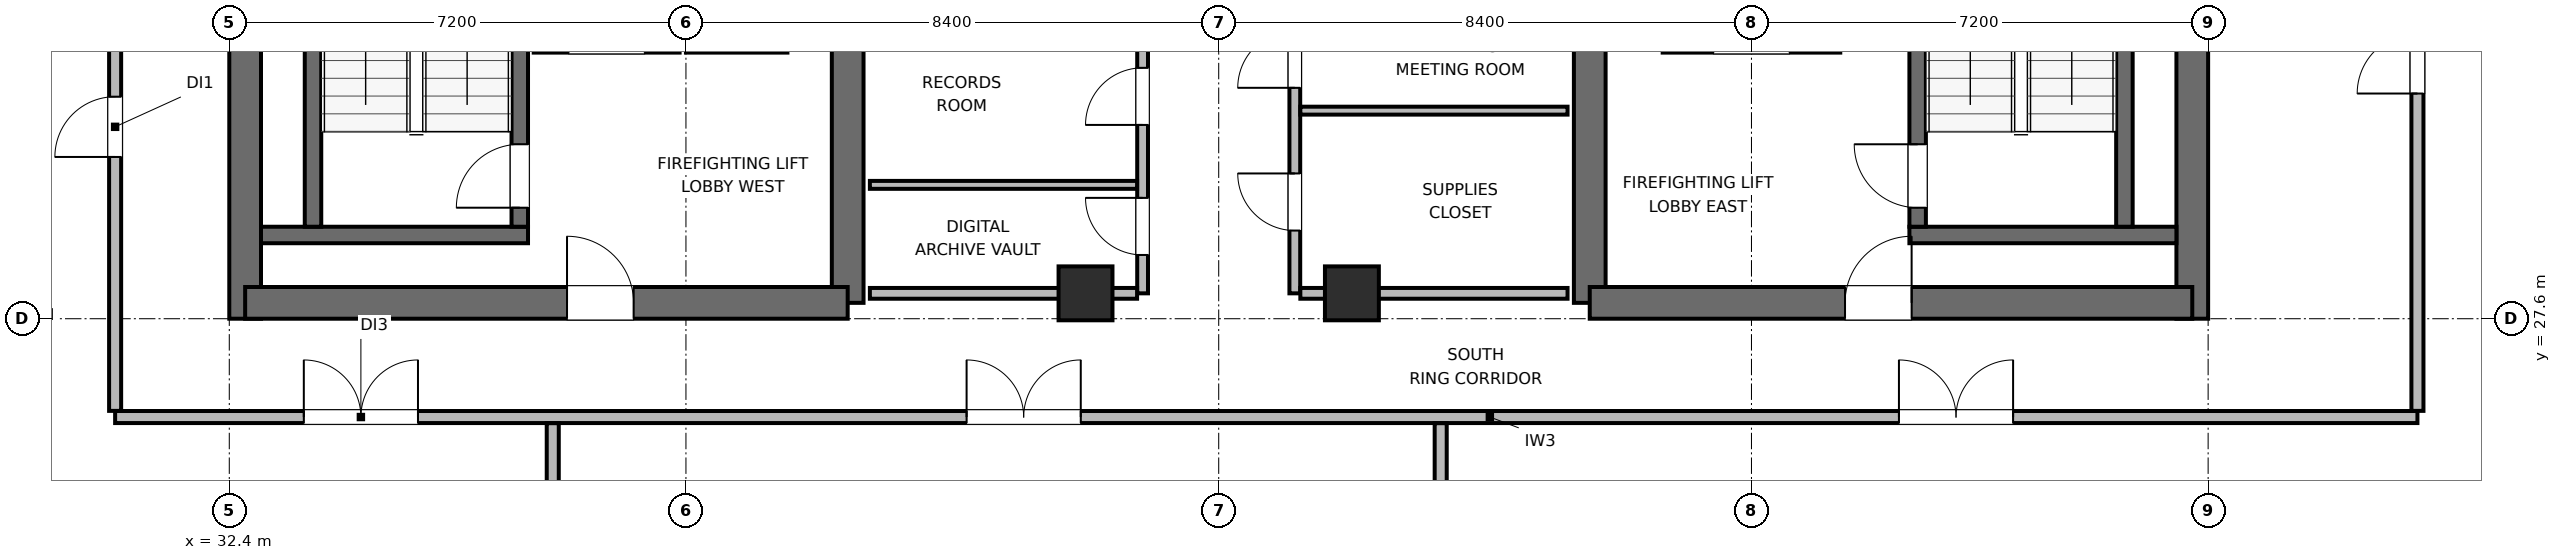
"""IFC4 building model, lengths in metres.
Left out: names, types, materials, properties, quantities, classifications, styles, units other than length and angle.
Written with IfcOpenShell. Run it as: python <this file> out.ifc"""

import sys

from ifc_helpers import new_model, si_unit, direction, frame, frame_2d, origin, origin_2d, place, context, subcontext, project, spatial, rectangle, extrude, element, fill, save


model = new_model("IFC4")
c1 = context("Model", 3, precision=1e-05, world=origin(), true_north=direction((0.0, 1.0)))
c2 = subcontext(c1, "Body", "Model", "MODEL_VIEW")
j1 = project(units=[si_unit("LENGTHUNIT", "METRE"), si_unit("PLANEANGLEUNIT", "RADIAN")], contexts=[c1])
p1 = place(None, origin())
s1 = spatial("IfcSite", under=j1, at=p1, CompositionType="ELEMENT")
p2 = place(p1, origin())
s2 = spatial("IfcBuilding", under=s1, at=p2, CompositionType="ELEMENT")
p3 = place(p2, frame((0.0, 0.0, 325.8)))
s3 = spatial("IfcBuildingStorey", under=s2, at=p3, CompositionType="ELEMENT", Elevation=325.8)
p4 = place(p3, frame((32.65, 27.6, 0.0), z_axis=(0.0, 0.0, 1.0), x_axis=(0.0, 1.0, 0.0)))
e1 = element("IfcWall", 1, at=p4, inside=s3, PredefinedType="SHEAR", context=c2, shape_type="SweptSolid", body=[
    extrude(rectangle(XDim=16.8, YDim=0.5, at=frame_2d((8.4, 0.0))), origin(), (0.0, 0.0, 1.0), 3.9),
])
p5 = place(p3, frame((42.15, 27.85, 0.0), z_axis=(0.0, 0.0, 1.0), x_axis=(0.0, 1.0, 0.0)))
e2 = element("IfcWall", 2, at=p5, inside=s3, PredefinedType="SHEAR", context=c2, shape_type="SweptSolid", body=[
    extrude(rectangle(XDim=6.55, YDim=0.5, at=frame_2d((3.275, 0.0))), origin(), (0.0, 0.0, 1.0), 3.9),
])
p6 = place(p3, frame((32.65, 27.85, 0.0), z_axis=(0.0, 0.0, 1.0), x_axis=(1.0, 0.0, 0.0)))
e3 = element("IfcWall", 3, at=p6, inside=s3, PredefinedType="SHEAR", context=c2, shape_type="SweptSolid", body=[
    extrude(rectangle(XDim=9.5, YDim=0.5, at=frame_2d((4.75, 0.0))), origin(), (0.0, 0.0, 1.0), 3.9),
])
p7 = place(p6, frame((5.075, 0.0, 0.0)))
e4 = element("IfcOpeningElement", 4, at=p7, cuts=e3, PredefinedType="OPENING", context=c2, shape_type="SweptSolid", body=[
    extrude(rectangle(XDim=1.05, YDim=2.04, at=frame_2d((0.525, 1.02))), frame((0.0, 0.26, 0.0), z_axis=(0.0, -1.0, 0.0), x_axis=(1.0, 0.0, 0.0)), (0.0, 0.0, 1.0), 0.52),
])
p8 = place(p3, frame((53.85, 27.85, 0.0), z_axis=(0.0, 0.0, 1.0), x_axis=(0.0, 1.0, 0.0)))
e5 = element("IfcWall", 5, at=p8, inside=s3, PredefinedType="SHEAR", context=c2, shape_type="SweptSolid", body=[
    extrude(rectangle(XDim=7.95, YDim=0.5, at=frame_2d((3.975, 0.0))), origin(), (0.0, 0.0, 1.0), 3.9),
])
p9 = place(p3, frame((63.35, 27.6, 0.0), z_axis=(0.0, 0.0, 1.0), x_axis=(0.0, 1.0, 0.0)))
e6 = element("IfcWall", 6, at=p9, inside=s3, PredefinedType="SHEAR", context=c2, shape_type="SweptSolid", body=[
    extrude(rectangle(XDim=16.8, YDim=0.5, at=frame_2d((8.4, 0.0))), origin(), (0.0, 0.0, 1.0), 3.9),
])
p10 = place(p3, frame((53.85, 27.85, 0.0), z_axis=(0.0, 0.0, 1.0), x_axis=(1.0, 0.0, 0.0)))
e7 = element("IfcWall", 7, at=p10, inside=s3, PredefinedType="SHEAR", context=c2, shape_type="SweptSolid", body=[
    extrude(rectangle(XDim=9.5, YDim=0.5, at=frame_2d((4.75, 0.0))), origin(), (0.0, 0.0, 1.0), 3.9),
])
p11 = place(p10, frame((4.025, 0.0, 0.0)))
e8 = element("IfcOpeningElement", 8, at=p11, cuts=e7, PredefinedType="OPENING", context=c2, shape_type="SweptSolid", body=[
    extrude(rectangle(XDim=1.05, YDim=2.04, at=frame_2d((0.525, 1.02))), frame((0.0, 0.26, 0.0), z_axis=(0.0, -1.0, 0.0), x_axis=(1.0, 0.0, 0.0)), (0.0, 0.0, 1.0), 0.52),
])
p12 = place(p3, frame((32.9, 28.92, 0.0), z_axis=(0.0, 0.0, 1.0), x_axis=(1.0, 0.0, 0.0)))
e9 = element("IfcWall", 9, at=p12, inside=s3, PredefinedType="SHEAR", context=c2, shape_type="SweptSolid", body=[
    extrude(rectangle(XDim=4.21, YDim=0.26, at=frame_2d((2.105, 0.0))), origin(), (0.0, 0.0, 1.0), 3.9),
])
p13 = place(p3, frame((33.72, 29.05, 0.0), z_axis=(0.0, 0.0, 1.0), x_axis=(0.0, 1.0, 0.0)))
e10 = element("IfcWall", 10, at=p13, inside=s3, PredefinedType="SHEAR", context=c2, shape_type="SweptSolid", body=[
    extrude(rectangle(XDim=7.6, YDim=0.26, at=frame_2d((3.8, 0.0))), origin(), (0.0, 0.0, 1.0), 3.9),
])
p14 = place(p3, frame((36.98, 29.05, 0.0), z_axis=(0.0, 0.0, 1.0), x_axis=(0.0, 1.0, 0.0)))
e11 = element("IfcWall", 11, at=p14, inside=s3, PredefinedType="SHEAR", context=c2, shape_type="SweptSolid", body=[
    extrude(rectangle(XDim=7.6, YDim=0.26, at=frame_2d((3.8, 0.0))), origin(), (0.0, 0.0, 1.0), 3.9),
])
p15 = place(p14, frame((0.3, 0.0, 0.0)))
e12 = element("IfcOpeningElement", 12, at=p15, cuts=e11, PredefinedType="OPENING", context=c2, shape_type="SweptSolid", body=[
    extrude(rectangle(XDim=1.0, YDim=2.04, at=frame_2d((0.5, 1.02))), frame((0.0, 0.14, 0.0), z_axis=(0.0, -1.0, 0.0), x_axis=(1.0, 0.0, 0.0)), (0.0, 0.0, 1.0), 0.28),
])
p16 = place(p3, frame((58.89, 28.92, 0.0), z_axis=(0.0, 0.0, 1.0), x_axis=(1.0, 0.0, 0.0)))
e13 = element("IfcWall", 13, at=p16, inside=s3, PredefinedType="SHEAR", context=c2, shape_type="SweptSolid", body=[
    extrude(rectangle(XDim=4.21, YDim=0.26, at=frame_2d((2.105, 0.0))), origin(), (0.0, 0.0, 1.0), 3.9),
])
p17 = place(p3, frame((59.02, 29.05, 0.0), z_axis=(0.0, 0.0, 1.0), x_axis=(0.0, 1.0, 0.0)))
e14 = element("IfcWall", 14, at=p17, inside=s3, PredefinedType="SHEAR", context=c2, shape_type="SweptSolid", body=[
    extrude(rectangle(XDim=7.6, YDim=0.26, at=frame_2d((3.8, 0.0))), origin(), (0.0, 0.0, 1.0), 3.9),
])
p18 = place(p17, frame((0.3, 0.0, 0.0)))
e15 = element("IfcOpeningElement", 15, at=p18, cuts=e14, PredefinedType="OPENING", context=c2, shape_type="SweptSolid", body=[
    extrude(rectangle(XDim=1.0, YDim=2.04, at=frame_2d((0.5, 1.02))), frame((0.0, 0.14, 0.0), z_axis=(0.0, -1.0, 0.0), x_axis=(1.0, 0.0, 0.0)), (0.0, 0.0, 1.0), 0.28),
])
p19 = place(p3, frame((62.28, 29.05, 0.0), z_axis=(0.0, 0.0, 1.0), x_axis=(0.0, 1.0, 0.0)))
e16 = element("IfcWall", 16, at=p19, inside=s3, PredefinedType="SHEAR", context=c2, shape_type="SweptSolid", body=[
    extrude(rectangle(XDim=7.6, YDim=0.26, at=frame_2d((3.8, 0.0))), origin(), (0.0, 0.0, 1.0), 3.9),
])
for number, where, z_axis, x_axis in (
    (17, (45.9, 28.0, 0.0), (0.0, 0.0, 1.0), (1.0, 0.0, 0.0)),
    (18, (50.1, 28.0, 0.0), (0.0, 0.0, 1.0), (1.0, 0.0, 0.0)),
):
    element("IfcColumn", number, at=place(p3, frame(where, z_axis=z_axis, x_axis=x_axis)), inside=s3, PredefinedType="COLUMN", context=c2, shape_type="SweptSolid", body=[
        extrude(rectangle(XDim=0.85, YDim=0.85, at=origin_2d()), origin(), (0.0, 0.0, 1.0), 3.9),
    ])
p20 = place(p3, frame((37.2, 31.9, 0.0), z_axis=(0.0, 0.0, 1.0), x_axis=(1.0, 0.0, 0.0)))
e19 = element("IfcWall", 19, at=p20, inside=s3, PredefinedType="PARTITIONING", context=c2, shape_type="SweptSolid", body=[
    extrude(rectangle(XDim=2.3, YDim=0.21, at=frame_2d((1.15, 0.0))), origin(), (0.0, 0.0, 1.0), 3.68),
])
p21 = place(p20, frame((0.55, 0.0, 0.0)))
e20 = element("IfcOpeningElement", 20, at=p21, cuts=e19, PredefinedType="OPENING", context=c2, shape_type="SweptSolid", body=[
    extrude(rectangle(XDim=1.2, YDim=2.04, at=frame_2d((0.6, 1.02))), frame((0.0, 0.115, 0.0), z_axis=(0.0, -1.0, 0.0), x_axis=(1.0, 0.0, 0.0)), (0.0, 0.0, 1.0), 0.23),
])
p22 = place(p3, frame((55.0, 31.9, 0.0), z_axis=(0.0, 0.0, 1.0), x_axis=(1.0, 0.0, 0.0)))
e21 = element("IfcWall", 21, at=p22, inside=s3, PredefinedType="PARTITIONING", context=c2, shape_type="SweptSolid", body=[
    extrude(rectangle(XDim=2.8, YDim=0.21, at=frame_2d((1.4, 0.0))), origin(), (0.0, 0.0, 1.0), 3.68),
])
p23 = place(p22, frame((0.8, 0.0, 0.0)))
e22 = element("IfcOpeningElement", 22, at=p23, cuts=e21, PredefinedType="OPENING", context=c2, shape_type="SweptSolid", body=[
    extrude(rectangle(XDim=1.2, YDim=2.04, at=frame_2d((0.6, 1.02))), frame((0.0, 0.115, 0.0), z_axis=(0.0, -1.0, 0.0), x_axis=(1.0, 0.0, 0.0)), (0.0, 0.0, 1.0), 0.23),
])
p24 = place(p3, frame((39.6, 31.9, 0.0), z_axis=(0.0, 0.0, 1.0), x_axis=(1.0, 0.0, 0.0)))
e23 = element("IfcWall", 23, at=p24, inside=s3, PredefinedType="PARTITIONING", context=c2, shape_type="SweptSolid", body=[
    extrude(rectangle(XDim=1.6, YDim=0.21, at=frame_2d((0.8, 0.0))), origin(), (0.0, 0.0, 1.0), 3.68),
])
p25 = place(p3, frame((46.8, 28.0, 0.0), z_axis=(0.0, 0.0, 1.0), x_axis=(0.0, 1.0, 0.0)))
e24 = element("IfcWall", 24, at=p25, inside=s3, PredefinedType="PARTITIONING", context=c2, shape_type="SweptSolid", body=[
    extrude(rectangle(XDim=4.5, YDim=0.17, at=frame_2d((2.25, 0.0))), origin(), (0.0, 0.0, 1.0), 3.68),
])
p26 = place(p25, frame((0.605, 0.0, 0.0)))
e25 = element("IfcOpeningElement", 25, at=p26, cuts=e24, PredefinedType="OPENING", context=c2, shape_type="SweptSolid", body=[
    extrude(rectangle(XDim=0.9, YDim=2.02, at=frame_2d((0.45, 1.01))), frame((0.0, 0.095, 0.0), z_axis=(0.0, -1.0, 0.0), x_axis=(1.0, 0.0, 0.0)), (0.0, 0.0, 1.0), 0.19),
])
p27 = place(p25, frame((2.655, 0.0, 0.0)))
e26 = element("IfcOpeningElement", 26, at=p27, cuts=e24, PredefinedType="OPENING", context=c2, shape_type="SweptSolid", body=[
    extrude(rectangle(XDim=0.9, YDim=2.02, at=frame_2d((0.45, 1.01))), frame((0.0, 0.095, 0.0), z_axis=(0.0, -1.0, 0.0), x_axis=(1.0, 0.0, 0.0)), (0.0, 0.0, 1.0), 0.19),
])
p28 = place(p3, frame((42.5, 28.0, 0.0), z_axis=(0.0, 0.0, 1.0), x_axis=(1.0, 0.0, 0.0)))
e27 = element("IfcWall", 27, at=p28, inside=s3, PredefinedType="PARTITIONING", context=c2, shape_type="SweptSolid", body=[
    extrude(rectangle(XDim=4.213, YDim=0.17, at=frame_2d((2.106, 0.0))), origin(), (0.0, 0.0, 1.0), 2.765),
])
p29 = place(p3, frame((42.5, 29.71, 0.0), z_axis=(0.0, 0.0, 1.0), x_axis=(1.0, 0.0, 0.0)))
e28 = element("IfcWall", 28, at=p29, inside=s3, PredefinedType="PARTITIONING", context=c2, shape_type="SweptSolid", body=[
    extrude(rectangle(XDim=4.213, YDim=0.125, at=frame_2d((2.106, 0.0))), origin(), (0.0, 0.0, 1.0), 3.68),
])
p30 = place(p3, frame((49.2, 28.0, 0.0), z_axis=(0.0, 0.0, 1.0), x_axis=(0.0, 1.0, 0.0)))
e29 = element("IfcWall", 29, at=p30, inside=s3, PredefinedType="PARTITIONING", context=c2, shape_type="SweptSolid", body=[
    extrude(rectangle(XDim=4.5, YDim=0.17, at=frame_2d((2.25, 0.0))), origin(), (0.0, 0.0, 1.0), 3.68),
])
p31 = place(p30, frame((0.99, 0.0, 0.0)))
e30 = element("IfcOpeningElement", 30, at=p31, cuts=e29, PredefinedType="OPENING", context=c2, shape_type="SweptSolid", body=[
    extrude(rectangle(XDim=0.9, YDim=2.02, at=frame_2d((0.45, 1.01))), frame((0.0, 0.095, 0.0), z_axis=(0.0, -1.0, 0.0), x_axis=(1.0, 0.0, 0.0)), (0.0, 0.0, 1.0), 0.19),
])
p32 = place(p30, frame((3.24, 0.0, 0.0)))
e31 = element("IfcOpeningElement", 31, at=p32, cuts=e29, PredefinedType="OPENING", context=c2, shape_type="SweptSolid", body=[
    extrude(rectangle(XDim=0.9, YDim=2.02, at=frame_2d((0.45, 1.01))), frame((0.0, 0.095, 0.0), z_axis=(0.0, -1.0, 0.0), x_axis=(1.0, 0.0, 0.0)), (0.0, 0.0, 1.0), 0.19),
])
p33 = place(p3, frame((49.287, 28.0, 0.0), z_axis=(0.0, 0.0, 1.0), x_axis=(1.0, 0.0, 0.0)))
e32 = element("IfcWall", 32, at=p33, inside=s3, PredefinedType="PARTITIONING", context=c2, shape_type="SweptSolid", body=[
    extrude(rectangle(XDim=4.213, YDim=0.17, at=frame_2d((2.106, 0.0))), origin(), (0.0, 0.0, 1.0), 2.765),
])
p34 = place(p3, frame((49.287, 30.88, 0.0), z_axis=(0.0, 0.0, 1.0), x_axis=(1.0, 0.0, 0.0)))
e33 = element("IfcWall", 33, at=p34, inside=s3, PredefinedType="PARTITIONING", context=c2, shape_type="SweptSolid", body=[
    extrude(rectangle(XDim=4.213, YDim=0.125, at=frame_2d((2.106, 0.0))), origin(), (0.0, 0.0, 1.0), 3.68),
])
p35 = place(p3, frame((30.6, 26.05, 0.0), z_axis=(0.0, 0.0, 1.0), x_axis=(1.0, 0.0, 0.0)))
e34 = element("IfcWall", 34, at=p35, inside=s3, PredefinedType="PLUMBINGWALL", context=c2, shape_type="SweptSolid", body=[
    extrude(rectangle(XDim=36.3, YDim=0.19, at=frame_2d((18.15, 0.0))), origin(), (0.0, 0.0, 1.0), 3.68),
])
p36 = place(p35, frame((2.975, 0.0, 0.0)))
e35 = element("IfcOpeningElement", 35, at=p36, cuts=e34, PredefinedType="OPENING", context=c2, shape_type="SweptSolid", body=[
    extrude(rectangle(XDim=1.8, YDim=2.06, at=frame_2d((0.9, 1.03))), frame((0.0, 0.105, 0.0), z_axis=(0.0, -1.0, 0.0), x_axis=(1.0, 0.0, 0.0)), (0.0, 0.0, 1.0), 0.21),
])
p37 = place(p35, frame((13.425, 0.0, 0.0)))
e36 = element("IfcOpeningElement", 36, at=p37, cuts=e34, PredefinedType="OPENING", context=c2, shape_type="SweptSolid", body=[
    extrude(rectangle(XDim=1.8, YDim=2.06, at=frame_2d((0.9, 1.03))), frame((0.0, 0.105, 0.0), z_axis=(0.0, -1.0, 0.0), x_axis=(1.0, 0.0, 0.0)), (0.0, 0.0, 1.0), 0.21),
])
p38 = place(p35, frame((28.125, 0.0, 0.0)))
e37 = element("IfcOpeningElement", 37, at=p38, cuts=e34, PredefinedType="OPENING", context=c2, shape_type="SweptSolid", body=[
    extrude(rectangle(XDim=1.8, YDim=2.06, at=frame_2d((0.9, 1.03))), frame((0.0, 0.105, 0.0), z_axis=(0.0, -1.0, 0.0), x_axis=(1.0, 0.0, 0.0)), (0.0, 0.0, 1.0), 0.21),
])
p39 = place(p3, frame((30.6, 26.147, 0.0), z_axis=(0.0, 0.0, 1.0), x_axis=(0.0, 1.0, 0.0)))
e38 = element("IfcWall", 38, at=p39, inside=s3, PredefinedType="PLUMBINGWALL", context=c2, shape_type="SweptSolid", body=[
    extrude(rectangle(XDim=19.706, YDim=0.19, at=frame_2d((9.853, 0.0))), origin(), (0.0, 0.0, 1.0), 3.68),
])
p40 = place(p39, frame((4.003, 0.0, 0.0)))
e39 = element("IfcOpeningElement", 39, at=p40, cuts=e38, PredefinedType="OPENING", context=c2, shape_type="SweptSolid", body=[
    extrude(rectangle(XDim=0.95, YDim=2.04, at=frame_2d((0.475, 1.02))), frame((0.0, 0.105, 0.0), z_axis=(0.0, -1.0, 0.0), x_axis=(1.0, 0.0, 0.0)), (0.0, 0.0, 1.0), 0.21),
])
p41 = place(p39, frame((13.953, 0.0, 0.0)))
e40 = element("IfcOpeningElement", 40, at=p41, cuts=e38, PredefinedType="OPENING", context=c2, shape_type="SweptSolid", body=[
    extrude(rectangle(XDim=0.95, YDim=2.04, at=frame_2d((0.475, 1.02))), frame((0.0, 0.105, 0.0), z_axis=(0.0, -1.0, 0.0), x_axis=(1.0, 0.0, 0.0)), (0.0, 0.0, 1.0), 0.21),
])
p42 = place(p3, frame((66.9, 26.147, 0.0), z_axis=(0.0, 0.0, 1.0), x_axis=(0.0, 1.0, 0.0)))
e41 = element("IfcWall", 41, at=p42, inside=s3, PredefinedType="PLUMBINGWALL", context=c2, shape_type="SweptSolid", body=[
    extrude(rectangle(XDim=19.706, YDim=0.19, at=frame_2d((9.853, 0.0))), origin(), (0.0, 0.0, 1.0), 3.68),
])
p43 = place(p42, frame((5.003, 0.0, 0.0)))
e42 = element("IfcOpeningElement", 42, at=p43, cuts=e41, PredefinedType="OPENING", context=c2, shape_type="SweptSolid", body=[
    extrude(rectangle(XDim=0.95, YDim=2.04, at=frame_2d((0.475, 1.02))), frame((0.0, 0.105, 0.0), z_axis=(0.0, -1.0, 0.0), x_axis=(1.0, 0.0, 0.0)), (0.0, 0.0, 1.0), 0.21),
])
p44 = place(p42, frame((14.953, 0.0, 0.0)))
e43 = element("IfcOpeningElement", 43, at=p44, cuts=e41, PredefinedType="OPENING", context=c2, shape_type="SweptSolid", body=[
    extrude(rectangle(XDim=0.95, YDim=2.04, at=frame_2d((0.475, 1.02))), frame((0.0, 0.105, 0.0), z_axis=(0.0, -1.0, 0.0), x_axis=(1.0, 0.0, 0.0)), (0.0, 0.0, 1.0), 0.21),
])
p45 = place(p3, frame((37.5, 18.875, 0.0), z_axis=(0.0, 0.0, 1.0), x_axis=(0.0, 1.0, 0.0)))
e44 = element("IfcWall", 44, at=p45, inside=s3, PredefinedType="PLUMBINGWALL", context=c2, shape_type="SweptSolid", body=[
    extrude(rectangle(XDim=7.078, YDim=0.19, at=frame_2d((3.539, 0.0))), origin(), (0.0, 0.0, 1.0), 3.68),
])
p46 = place(p3, frame((51.5, 20.075, 0.0), z_axis=(0.0, 0.0, 1.0), x_axis=(0.0, 1.0, 0.0)))
e45 = element("IfcWall", 45, at=p46, inside=s3, PredefinedType="PLUMBINGWALL", context=c2, shape_type="SweptSolid", body=[
    extrude(rectangle(XDim=5.878, YDim=0.19, at=frame_2d((2.939, 0.0))), origin(), (0.0, 0.0, 1.0), 3.043),
])
p47 = place(p15, origin())
e46 = element("IfcDoor", 46, at=p47, inside=s3, OperationType="SINGLE_SWING_LEFT", PredefinedType="DOOR", context=c2, shape_type="SweptSolid", body=[
    extrude(rectangle(XDim=1.0, YDim=2.04, at=frame_2d((0.5, 1.02))), frame((0.0, 0.025, 0.0), z_axis=(0.0, -1.0, 0.0), x_axis=(1.0, 0.0, 0.0)), (0.0, 0.0, 1.0), 0.05),
])
fill(e12, e46)
p48 = place(p18, origin())
e47 = element("IfcDoor", 47, at=p48, inside=s3, OperationType="SINGLE_SWING_RIGHT", PredefinedType="DOOR", context=c2, shape_type="SweptSolid", body=[
    extrude(rectangle(XDim=1.0, YDim=2.04, at=frame_2d((0.5, 1.02))), frame((0.0, 0.025, 0.0), z_axis=(0.0, -1.0, 0.0), x_axis=(1.0, 0.0, 0.0)), (0.0, 0.0, 1.0), 0.05),
])
fill(e15, e47)
p49 = place(p7, origin())
e48 = element("IfcDoor", 48, at=p49, inside=s3, OperationType="SINGLE_SWING_LEFT", PredefinedType="DOOR", context=c2, shape_type="SweptSolid", body=[
    extrude(rectangle(XDim=1.05, YDim=2.04, at=frame_2d((0.525, 1.02))), frame((0.0, 0.025, 0.0), z_axis=(0.0, -1.0, 0.0), x_axis=(1.0, 0.0, 0.0)), (0.0, 0.0, 1.0), 0.05),
])
fill(e4, e48)
p50 = place(p11, origin())
e49 = element("IfcDoor", 49, at=p50, inside=s3, OperationType="SINGLE_SWING_RIGHT", PredefinedType="DOOR", context=c2, shape_type="SweptSolid", body=[
    extrude(rectangle(XDim=1.05, YDim=2.04, at=frame_2d((0.525, 1.02))), frame((0.0, 0.025, 0.0), z_axis=(0.0, -1.0, 0.0), x_axis=(1.0, 0.0, 0.0)), (0.0, 0.0, 1.0), 0.05),
])
fill(e8, e49)
p51 = place(p26, origin())
e50 = element("IfcDoor", 50, at=p51, inside=s3, OperationType="SINGLE_SWING_RIGHT", PredefinedType="DOOR", context=c2, shape_type="SweptSolid", body=[
    extrude(rectangle(XDim=0.9, YDim=2.02, at=frame_2d((0.45, 1.01))), frame((0.0, 0.025, 0.0), z_axis=(0.0, -1.0, 0.0), x_axis=(1.0, 0.0, 0.0)), (0.0, 0.0, 1.0), 0.05),
])
fill(e25, e50)
p52 = place(p27, origin())
e51 = element("IfcDoor", 51, at=p52, inside=s3, OperationType="SINGLE_SWING_LEFT", PredefinedType="DOOR", context=c2, shape_type="SweptSolid", body=[
    extrude(rectangle(XDim=0.9, YDim=2.02, at=frame_2d((0.45, 1.01))), frame((0.0, 0.025, 0.0), z_axis=(0.0, -1.0, 0.0), x_axis=(1.0, 0.0, 0.0)), (0.0, 0.0, 1.0), 0.05),
])
fill(e26, e51)
p53 = place(p31, origin())
e52 = element("IfcDoor", 52, at=p53, inside=s3, OperationType="SINGLE_SWING_RIGHT", PredefinedType="DOOR", context=c2, shape_type="SweptSolid", body=[
    extrude(rectangle(XDim=0.9, YDim=2.02, at=frame_2d((0.45, 1.01))), frame((0.0, 0.025, 0.0), z_axis=(0.0, -1.0, 0.0), x_axis=(1.0, 0.0, 0.0)), (0.0, 0.0, 1.0), 0.05),
])
fill(e30, e52)
p54 = place(p32, origin())
e53 = element("IfcDoor", 53, at=p54, inside=s3, OperationType="SINGLE_SWING_LEFT", PredefinedType="DOOR", context=c2, shape_type="SweptSolid", body=[
    extrude(rectangle(XDim=0.9, YDim=2.02, at=frame_2d((0.45, 1.01))), frame((0.0, 0.025, 0.0), z_axis=(0.0, -1.0, 0.0), x_axis=(1.0, 0.0, 0.0)), (0.0, 0.0, 1.0), 0.05),
])
fill(e31, e53)
p55 = place(p36, origin())
e54 = element("IfcDoor", 54, at=p55, inside=s3, OperationType="DOUBLE_DOOR_SINGLE_SWING", PredefinedType="DOOR", context=c2, shape_type="SweptSolid", body=[
    extrude(rectangle(XDim=1.8, YDim=2.06, at=frame_2d((0.9, 1.03))), frame((0.0, 0.025, 0.0), z_axis=(0.0, -1.0, 0.0), x_axis=(1.0, 0.0, 0.0)), (0.0, 0.0, 1.0), 0.05),
])
fill(e35, e54)
p56 = place(p37, origin())
e55 = element("IfcDoor", 55, at=p56, inside=s3, OperationType="DOUBLE_DOOR_SINGLE_SWING", PredefinedType="DOOR", context=c2, shape_type="SweptSolid", body=[
    extrude(rectangle(XDim=1.8, YDim=2.06, at=frame_2d((0.9, 1.03))), frame((0.0, 0.025, 0.0), z_axis=(0.0, -1.0, 0.0), x_axis=(1.0, 0.0, 0.0)), (0.0, 0.0, 1.0), 0.05),
])
fill(e36, e55)
p57 = place(p38, origin())
e56 = element("IfcDoor", 56, at=p57, inside=s3, OperationType="DOUBLE_DOOR_SINGLE_SWING", PredefinedType="DOOR", context=c2, shape_type="SweptSolid", body=[
    extrude(rectangle(XDim=1.8, YDim=2.06, at=frame_2d((0.9, 1.03))), frame((0.0, 0.025, 0.0), z_axis=(0.0, -1.0, 0.0), x_axis=(1.0, 0.0, 0.0)), (0.0, 0.0, 1.0), 0.05),
])
fill(e37, e56)
p58 = place(p40, origin())
e57 = element("IfcDoor", 57, at=p58, inside=s3, OperationType="SINGLE_SWING_LEFT", PredefinedType="DOOR", context=c2, shape_type="SweptSolid", body=[
    extrude(rectangle(XDim=0.95, YDim=2.04, at=frame_2d((0.475, 1.02))), frame((0.0, 0.025, 0.0), z_axis=(0.0, -1.0, 0.0), x_axis=(1.0, 0.0, 0.0)), (0.0, 0.0, 1.0), 0.05),
])
fill(e39, e57)
p59 = place(p43, origin())
e58 = element("IfcDoor", 58, at=p59, inside=s3, OperationType="SINGLE_SWING_LEFT", PredefinedType="DOOR", context=c2, shape_type="SweptSolid", body=[
    extrude(rectangle(XDim=0.95, YDim=2.04, at=frame_2d((0.475, 1.02))), frame((0.0, 0.025, 0.0), z_axis=(0.0, -1.0, 0.0), x_axis=(1.0, 0.0, 0.0)), (0.0, 0.0, 1.0), 0.05),
])
fill(e42, e58)
save(model, sys.argv[1])
